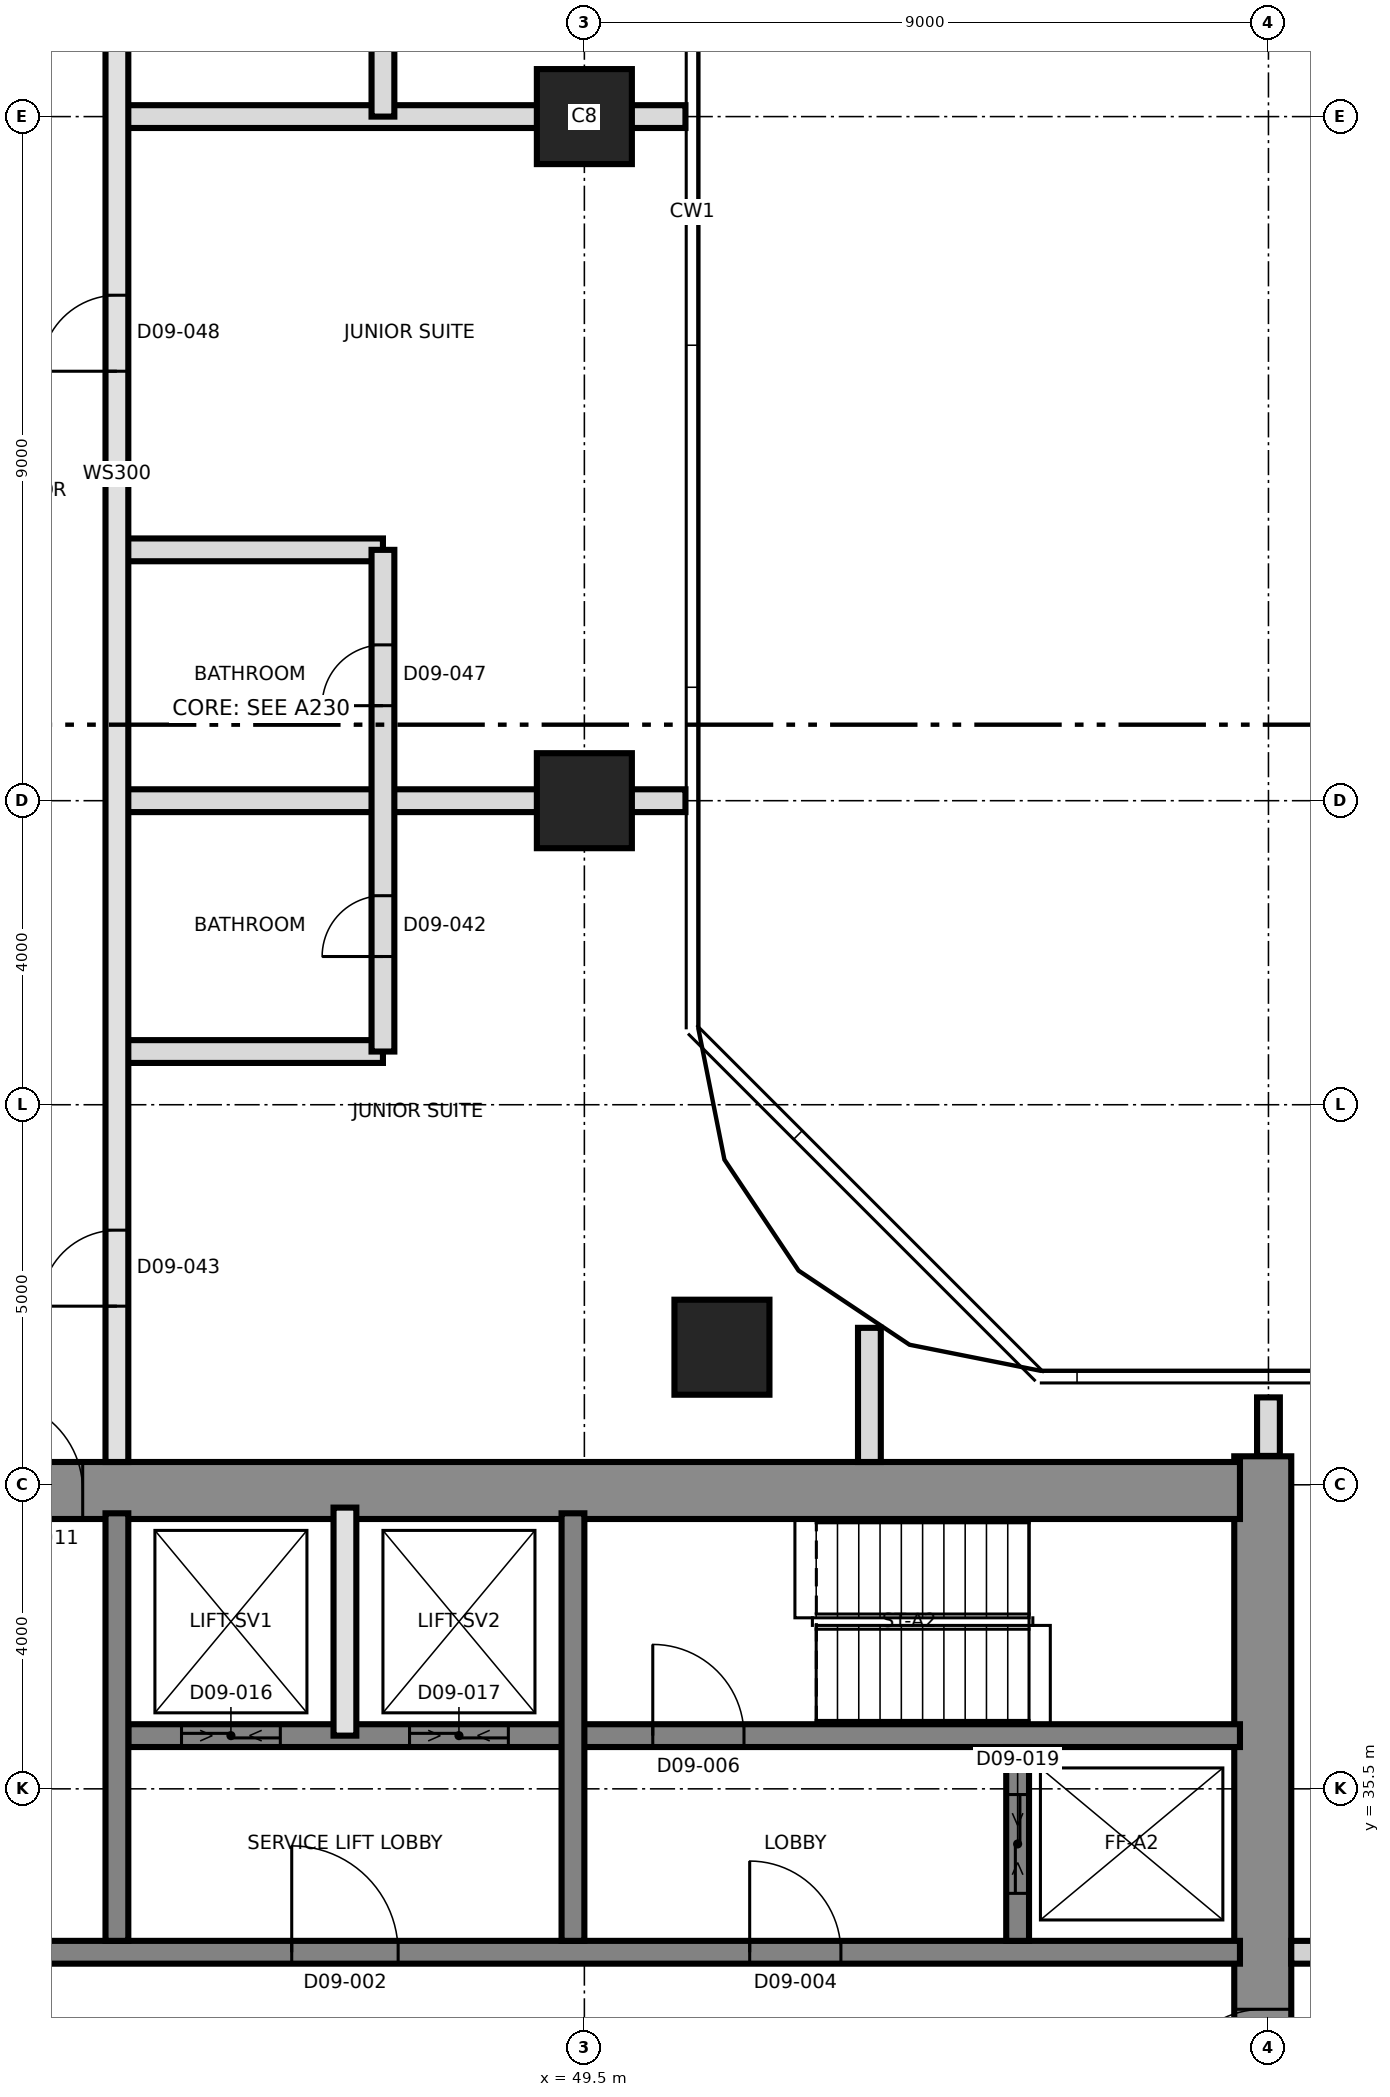
"""IFC4 building model, lengths in metres.
Left out: names, types, materials, properties, quantities, classifications, styles, units other than length and angle.
Written with IfcOpenShell. Run it as: python <this file> out.ifc"""

import sys

from ifc_helpers import new_model, si_unit, direction, frame, frame_2d, origin, origin_2d, place, context, subcontext, project, spatial, rectangle, extrude, element, fill, save


model = new_model("IFC4")
c1 = context("Model", 3, precision=1e-05, world=origin(), true_north=direction((0.0, 1.0)))
c2 = subcontext(c1, "Body", "Model", "MODEL_VIEW")
j1 = project(units=[si_unit("LENGTHUNIT", "METRE"), si_unit("PLANEANGLEUNIT", "RADIAN")], contexts=[c1])
p1 = place(None, origin())
s1 = spatial("IfcSite", under=j1, at=p1, CompositionType="ELEMENT")
p2 = place(p1, origin())
s2 = spatial("IfcBuilding", under=s1, at=p2, CompositionType="ELEMENT")
p3 = place(p2, frame((0.0, 0.0, 113.0)))
s3 = spatial("IfcBuildingStorey", under=s2, at=p3, CompositionType="ELEMENT", Elevation=113.0)
p4 = place(p3, frame((58.425, 21.125, 0.0), z_axis=(0.0, 0.0, 1.0), x_axis=(0.0, 1.0, 0.0)))
e1 = element("IfcWall", 1, at=p4, inside=s3, PredefinedType="SHEAR", context=c2, shape_type="SweptSolid", body=[
    extrude(rectangle(XDim=18.75, YDim=0.75, at=frame_2d((9.375, 0.0))), origin(), (0.0, 0.0, 1.0), 3.7),
])
p5 = place(p4, frame((10.275, 0.0, 0.0)))
e2 = element("IfcOpeningElement", 2, at=p5, cuts=e1, PredefinedType="OPENING", context=c2, shape_type="SweptSolid", body=[
    extrude(rectangle(XDim=1.2, YDim=2.1, at=frame_2d((0.6, 1.05))), frame((0.0, 0.385, 0.0), z_axis=(0.0, -1.0, 0.0), x_axis=(1.0, 0.0, 0.0)), (0.0, 0.0, 1.0), 0.77),
])
p6 = place(p3, frame((31.125, 39.425, 0.0), z_axis=(0.0, 0.0, 1.0), x_axis=(1.0, 0.0, 0.0)))
e3 = element("IfcWall", 3, at=p6, inside=s3, PredefinedType="SHEAR", context=c2, shape_type="SweptSolid", body=[
    extrude(rectangle(XDim=27.0, YDim=0.75, at=frame_2d((13.5, 0.0))), origin(), (0.0, 0.0, 1.0), 3.7),
])
p7 = place(p6, frame((10.575, 0.0, 0.0)))
e4 = element("IfcOpeningElement", 4, at=p7, cuts=e3, PredefinedType="OPENING", context=c2, shape_type="SweptSolid", body=[
    extrude(rectangle(XDim=1.2, YDim=2.1, at=frame_2d((0.6, 1.05))), frame((0.0, 0.385, 0.0), z_axis=(0.0, -1.0, 0.0), x_axis=(1.0, 0.0, 0.0)), (0.0, 0.0, 1.0), 0.77),
])
p8 = place(p3, frame((31.875, 33.35, 0.0), z_axis=(0.0, 0.0, 1.0), x_axis=(1.0, 0.0, 0.0)))
e5 = element("IfcWall", 5, at=p8, inside=s3, PredefinedType="SHEAR", context=c2, shape_type="SweptSolid", body=[
    extrude(rectangle(XDim=26.25, YDim=0.3, at=frame_2d((13.125, 0.0))), origin(), (0.0, 0.0, 1.0), 3.7),
])
p9 = place(p8, frame((13.775, 0.0, 0.0)))
e6 = element("IfcOpeningElement", 6, at=p9, cuts=e5, PredefinedType="OPENING", context=c2, shape_type="SweptSolid", body=[
    extrude(rectangle(XDim=1.4, YDim=2.1, at=frame_2d((0.7, 1.05))), frame((0.0, 0.16, 0.0), z_axis=(0.0, -1.0, 0.0), x_axis=(1.0, 0.0, 0.0)), (0.0, 0.0, 1.0), 0.32),
])
p10 = place(p8, frame((5.25, 0.0, 0.0)))
e7 = element("IfcOpeningElement", 7, at=p10, cuts=e5, PredefinedType="OPENING", context=c2, shape_type="SweptSolid", body=[
    extrude(rectangle(XDim=1.2, YDim=2.1, at=frame_2d((0.6, 1.05))), frame((0.0, 0.16, 0.0), z_axis=(0.0, -1.0, 0.0), x_axis=(1.0, 0.0, 0.0)), (0.0, 0.0, 1.0), 0.32),
])
p11 = place(p8, frame((19.8, 0.0, 0.0)))
e8 = element("IfcOpeningElement", 8, at=p11, cuts=e5, PredefinedType="OPENING", context=c2, shape_type="SweptSolid", body=[
    extrude(rectangle(XDim=1.2, YDim=2.1, at=frame_2d((0.6, 1.05))), frame((0.0, 0.16, 0.0), z_axis=(0.0, -1.0, 0.0), x_axis=(1.0, 0.0, 0.0)), (0.0, 0.0, 1.0), 0.32),
])
p12 = place(p3, frame((43.5, 36.2, 0.0), z_axis=(0.0, 0.0, 1.0), x_axis=(1.0, 0.0, 0.0)))
e9 = element("IfcWall", 9, at=p12, inside=s3, PredefinedType="SHEAR", context=c2, shape_type="SweptSolid", body=[
    extrude(rectangle(XDim=14.625, YDim=0.3, at=frame_2d((7.312, 0.0))), origin(), (0.0, 0.0, 1.0), 3.7),
])
p13 = place(p12, frame((6.9, 0.0, 0.0)))
e10 = element("IfcOpeningElement", 10, at=p13, cuts=e9, PredefinedType="OPENING", context=c2, shape_type="SweptSolid", body=[
    extrude(rectangle(XDim=1.2, YDim=2.1, at=frame_2d((0.6, 1.05))), frame((0.0, 0.16, 0.0), z_axis=(0.0, -1.0, 0.0), x_axis=(1.0, 0.0, 0.0)), (0.0, 0.0, 1.0), 0.32),
])
p14 = place(p12, frame((0.7, 0.0, 0.0)))
e11 = element("IfcOpeningElement", 11, at=p14, cuts=e9, PredefinedType="OPENING", context=c2, shape_type="SweptSolid", body=[
    extrude(rectangle(XDim=1.3, YDim=2.4, at=frame_2d((0.65, 1.2))), frame((0.0, 0.16, 0.0), z_axis=(0.0, -1.0, 0.0), x_axis=(1.0, 0.0, 0.0)), (0.0, 0.0, 1.0), 0.32),
])
p15 = place(p12, frame((3.7, 0.0, 0.0)))
e12 = element("IfcOpeningElement", 12, at=p15, cuts=e9, PredefinedType="OPENING", context=c2, shape_type="SweptSolid", body=[
    extrude(rectangle(XDim=1.3, YDim=2.4, at=frame_2d((0.65, 1.2))), frame((0.0, 0.16, 0.0), z_axis=(0.0, -1.0, 0.0), x_axis=(1.0, 0.0, 0.0)), (0.0, 0.0, 1.0), 0.32),
])
for number, where, z_axis, x_axis in (
    (13, (43.35, 33.5, 0.0), (0.0, 0.0, 1.0), (0.0, 1.0, 0.0)),
    (14, (49.35, 33.5, 0.0), (0.0, 0.0, 1.0), (0.0, 1.0, 0.0)),
):
    element("IfcWall", number, at=place(p3, frame(where, z_axis=z_axis, x_axis=x_axis)), inside=s3, PredefinedType="SHEAR", context=c2, shape_type="SweptSolid", body=[
        extrude(rectangle(XDim=5.625, YDim=0.3, at=frame_2d((2.812, 0.0))), origin(), (0.0, 0.0, 1.0), 3.7),
    ])
p16 = place(p3, frame((55.2, 33.5, 0.0), z_axis=(0.0, 0.0, 1.0), x_axis=(0.0, 1.0, 0.0)))
e15 = element("IfcWall", 15, at=p16, inside=s3, PredefinedType="SHEAR", context=c2, shape_type="SweptSolid", body=[
    extrude(rectangle(XDim=2.55, YDim=0.3, at=frame_2d((1.275, 0.0))), origin(), (0.0, 0.0, 1.0), 3.7),
])
p17 = place(p16, frame((0.625, 0.0, 0.0)))
e16 = element("IfcOpeningElement", 16, at=p17, cuts=e15, PredefinedType="OPENING", context=c2, shape_type="SweptSolid", body=[
    extrude(rectangle(XDim=1.3, YDim=2.4, at=frame_2d((0.65, 1.2))), frame((0.0, 0.16, 0.0), z_axis=(0.0, -1.0, 0.0), x_axis=(1.0, 0.0, 0.0)), (0.0, 0.0, 1.0), 0.32),
])
for number, where, z_axis, x_axis in (
    (17, (51.31, 41.31, 0.0), (0.0, 0.0, 1.0), (1.0, 0.0, 0.0)),
    (18, (49.5, 48.5, 0.0), (0.0, 0.0, 1.0), (1.0, 0.0, 0.0)),
    (19, (49.5, 57.5, 0.0), (0.0, 0.0, 1.0), (1.0, 0.0, 0.0)),
):
    element("IfcColumn", number, at=place(p3, frame(where, z_axis=z_axis, x_axis=x_axis)), inside=s3, PredefinedType="COLUMN", context=c2, shape_type="SweptSolid", body=[
        extrude(rectangle(XDim=1.25, YDim=1.25, at=origin_2d()), origin(), (0.0, 0.0, 1.0), 3.7),
    ])
p18 = place(p3, frame((46.35, 36.2, 0.0), z_axis=(0.0, 0.0, 1.0), x_axis=(0.0, 1.0, 0.0)))
e20 = element("IfcWall", 20, at=p18, inside=s3, PredefinedType="SOLIDWALL", context=c2, shape_type="SweptSolid", body=[
    extrude(rectangle(XDim=3.0, YDim=0.3, at=frame_2d((1.5, 0.0))), origin(), (0.0, 0.0, 1.0), 3.4),
])
p19 = place(p3, frame((58.8, 33.35, 0.0), z_axis=(0.0, 0.0, 1.0), x_axis=(1.0, 0.0, 0.0)))
e21 = element("IfcWall", 21, at=p19, inside=s3, PredefinedType="PARTITIONING", context=c2, shape_type="SweptSolid", body=[
    extrude(rectangle(XDim=26.53, YDim=0.3, at=frame_2d((13.265, 0.0))), origin(), (0.0, 0.0, 1.0), 3.4),
])
p20 = place(p19, frame((2.05, 0.0, 0.0)))
e22 = element("IfcOpeningElement", 22, at=p20, cuts=e21, PredefinedType="OPENING", context=c2, shape_type="SweptSolid", body=[
    extrude(rectangle(XDim=1.0, YDim=2.4, at=frame_2d((0.5, 1.2))), frame((0.0, 0.16, 0.0), z_axis=(0.0, -1.0, 0.0), x_axis=(1.0, 0.0, 0.0)), (0.0, 0.0, 1.0), 0.32),
])
p21 = place(p19, frame((11.95, 0.0, 0.0)))
e23 = element("IfcOpeningElement", 23, at=p21, cuts=e21, PredefinedType="OPENING", context=c2, shape_type="SweptSolid", body=[
    extrude(rectangle(XDim=1.0, YDim=2.1, at=frame_2d((0.5, 1.05))), frame((0.0, 0.16, 0.0), z_axis=(0.0, -1.0, 0.0), x_axis=(1.0, 0.0, 0.0)), (0.0, 0.0, 1.0), 0.32),
])
p22 = place(p19, frame((13.6, 0.0, 0.0)))
e24 = element("IfcOpeningElement", 24, at=p22, cuts=e21, PredefinedType="OPENING", context=c2, shape_type="SweptSolid", body=[
    extrude(rectangle(XDim=1.0, YDim=2.1, at=frame_2d((0.5, 1.05))), frame((0.0, 0.16, 0.0), z_axis=(0.0, -1.0, 0.0), x_axis=(1.0, 0.0, 0.0)), (0.0, 0.0, 1.0), 0.32),
])
p23 = place(p19, frame((21.7, 0.0, 0.0)))
e25 = element("IfcOpeningElement", 25, at=p23, cuts=e21, PredefinedType="OPENING", context=c2, shape_type="SweptSolid", body=[
    extrude(rectangle(XDim=1.0, YDim=2.4, at=frame_2d((0.5, 1.2))), frame((0.0, 0.16, 0.0), z_axis=(0.0, -1.0, 0.0), x_axis=(1.0, 0.0, 0.0)), (0.0, 0.0, 1.0), 0.32),
])
p24 = place(p3, frame((43.35, 45.2, 0.0), z_axis=(0.0, 0.0, 1.0), x_axis=(1.0, 0.0, 0.0)))
e26 = element("IfcWall", 26, at=p24, inside=s3, PredefinedType="PARTITIONING", context=c2, shape_type="SweptSolid", body=[
    extrude(rectangle(XDim=3.5, YDim=0.3, at=frame_2d((1.75, 0.0))), origin(), (0.0, 0.0, 1.0), 3.4),
])
p25 = place(p3, frame((43.35, 48.5, 0.0), z_axis=(0.0, 0.0, 1.0), x_axis=(1.0, 0.0, 0.0)))
e27 = element("IfcWall", 27, at=p25, inside=s3, PredefinedType="PARTITIONING", context=c2, shape_type="SweptSolid", body=[
    extrude(rectangle(XDim=7.48, YDim=0.3, at=frame_2d((3.74, 0.0))), origin(), (0.0, 0.0, 1.0), 3.4),
])
p26 = place(p3, frame((43.35, 51.8, 0.0), z_axis=(0.0, 0.0, 1.0), x_axis=(1.0, 0.0, 0.0)))
e28 = element("IfcWall", 28, at=p26, inside=s3, PredefinedType="PARTITIONING", context=c2, shape_type="SweptSolid", body=[
    extrude(rectangle(XDim=3.5, YDim=0.3, at=frame_2d((1.75, 0.0))), origin(), (0.0, 0.0, 1.0), 3.4),
])
p27 = place(p3, frame((43.35, 57.5, 0.0), z_axis=(0.0, 0.0, 1.0), x_axis=(1.0, 0.0, 0.0)))
e29 = element("IfcWall", 29, at=p27, inside=s3, PredefinedType="PARTITIONING", context=c2, shape_type="SweptSolid", body=[
    extrude(rectangle(XDim=7.48, YDim=0.3, at=frame_2d((3.74, 0.0))), origin(), (0.0, 0.0, 1.0), 3.4),
])
p28 = place(p3, frame((43.35, 39.8, 0.0), z_axis=(0.0, 0.0, 1.0), x_axis=(0.0, 1.0, 0.0)))
e30 = element("IfcWall", 30, at=p28, inside=s3, PredefinedType="SOLIDWALL", context=c2, shape_type="SweptSolid", body=[
    extrude(rectangle(XDim=26.0, YDim=0.3, at=frame_2d((13.0, 0.0))), origin(), (0.0, 0.0, 1.0), 3.4),
])
p29 = place(p28, frame((2.05, 0.0, 0.0)))
e31 = element("IfcOpeningElement", 31, at=p29, cuts=e30, PredefinedType="OPENING", context=c2, shape_type="SweptSolid", body=[
    extrude(rectangle(XDim=1.0, YDim=2.4, at=frame_2d((0.5, 1.2))), frame((0.0, 0.16, 0.0), z_axis=(0.0, -1.0, 0.0), x_axis=(1.0, 0.0, 0.0)), (0.0, 0.0, 1.0), 0.32),
])
p30 = place(p28, frame((14.35, 0.0, 0.0)))
e32 = element("IfcOpeningElement", 32, at=p30, cuts=e30, PredefinedType="OPENING", context=c2, shape_type="SweptSolid", body=[
    extrude(rectangle(XDim=1.0, YDim=2.4, at=frame_2d((0.5, 1.2))), frame((0.0, 0.16, 0.0), z_axis=(0.0, -1.0, 0.0), x_axis=(1.0, 0.0, 0.0)), (0.0, 0.0, 1.0), 0.32),
])
p31 = place(p28, frame((21.25, 0.0, 0.0)))
e33 = element("IfcOpeningElement", 33, at=p31, cuts=e30, PredefinedType="OPENING", context=c2, shape_type="SweptSolid", body=[
    extrude(rectangle(XDim=1.0, YDim=2.4, at=frame_2d((0.5, 1.2))), frame((0.0, 0.16, 0.0), z_axis=(0.0, -1.0, 0.0), x_axis=(1.0, 0.0, 0.0)), (0.0, 0.0, 1.0), 0.32),
])
p32 = place(p3, frame((46.85, 45.2, 0.0), z_axis=(0.0, 0.0, 1.0), x_axis=(0.0, 1.0, 0.0)))
e34 = element("IfcWall", 34, at=p32, inside=s3, PredefinedType="PARTITIONING", context=c2, shape_type="SweptSolid", body=[
    extrude(rectangle(XDim=6.6, YDim=0.3, at=frame_2d((3.3, 0.0))), origin(), (0.0, 0.0, 1.0), 3.4),
])
p33 = place(p32, frame((1.25, 0.0, 0.0)))
e35 = element("IfcOpeningElement", 35, at=p33, cuts=e34, PredefinedType="OPENING", context=c2, shape_type="SweptSolid", body=[
    extrude(rectangle(XDim=0.8, YDim=2.1, at=frame_2d((0.4, 1.05))), frame((0.0, 0.16, 0.0), z_axis=(0.0, -1.0, 0.0), x_axis=(1.0, 0.0, 0.0)), (0.0, 0.0, 1.0), 0.32),
])
p34 = place(p32, frame((4.55, 0.0, 0.0)))
e36 = element("IfcOpeningElement", 36, at=p34, cuts=e34, PredefinedType="OPENING", context=c2, shape_type="SweptSolid", body=[
    extrude(rectangle(XDim=0.8, YDim=2.1, at=frame_2d((0.4, 1.05))), frame((0.0, 0.16, 0.0), z_axis=(0.0, -1.0, 0.0), x_axis=(1.0, 0.0, 0.0)), (0.0, 0.0, 1.0), 0.32),
])
p35 = place(p3, frame((46.85, 57.5, 0.0), z_axis=(0.0, 0.0, 1.0), x_axis=(0.0, 1.0, 0.0)))
e37 = element("IfcWall", 37, at=p35, inside=s3, PredefinedType="PARTITIONING", context=c2, shape_type="SweptSolid", body=[
    extrude(rectangle(XDim=3.3, YDim=0.3, at=frame_2d((1.65, 0.0))), origin(), (0.0, 0.0, 1.0), 3.4),
])
p36 = place(p35, frame((1.25, 0.0, 0.0)))
e38 = element("IfcOpeningElement", 38, at=p36, cuts=e37, PredefinedType="OPENING", context=c2, shape_type="SweptSolid", body=[
    extrude(rectangle(XDim=0.8, YDim=2.1, at=frame_2d((0.4, 1.05))), frame((0.0, 0.16, 0.0), z_axis=(0.0, -1.0, 0.0), x_axis=(1.0, 0.0, 0.0)), (0.0, 0.0, 1.0), 0.32),
])
p37 = place(p3, frame((53.25, 39.8, 0.0), z_axis=(0.0, 0.0, 1.0), x_axis=(0.0, 1.0, 0.0)))
e39 = element("IfcWall", 39, at=p37, inside=s3, PredefinedType="PARTITIONING", context=c2, shape_type="SweptSolid", body=[
    extrude(rectangle(XDim=1.765, YDim=0.3, at=frame_2d((0.882, 0.0))), origin(), (0.0, 0.0, 1.0), 3.4),
])
p38 = place(p3, frame((58.5, 39.88, 0.0), z_axis=(0.0, 0.0, 1.0), x_axis=(0.0, 1.0, 0.0)))
e40 = element("IfcWall", 40, at=p38, inside=s3, PredefinedType="PARTITIONING", context=c2, shape_type="SweptSolid", body=[
    extrude(rectangle(XDim=0.77, YDim=0.3, at=frame_2d((0.385, 0.0))), origin(), (0.0, 0.0, 1.0), 3.4),
])
p39 = place(p9, origin())
e41 = element("IfcDoor", 41, at=p39, inside=s3, OperationType="SINGLE_SWING_RIGHT", PredefinedType="DOOR", context=c2, shape_type="SweptSolid", body=[
    extrude(rectangle(XDim=1.4, YDim=2.1, at=frame_2d((0.7, 1.05))), frame((0.0, 0.025, 0.0), z_axis=(0.0, -1.0, 0.0), x_axis=(1.0, 0.0, 0.0)), (0.0, 0.0, 1.0), 0.05),
])
fill(e6, e41)
p40 = place(p11, origin())
e42 = element("IfcDoor", 42, at=p40, inside=s3, OperationType="SINGLE_SWING_RIGHT", PredefinedType="DOOR", context=c2, shape_type="SweptSolid", body=[
    extrude(rectangle(XDim=1.2, YDim=2.1, at=frame_2d((0.6, 1.05))), frame((0.0, 0.025, 0.0), z_axis=(0.0, -1.0, 0.0), x_axis=(1.0, 0.0, 0.0)), (0.0, 0.0, 1.0), 0.05),
])
fill(e8, e42)
p41 = place(p13, origin())
e43 = element("IfcDoor", 43, at=p41, inside=s3, OperationType="SINGLE_SWING_LEFT", PredefinedType="DOOR", context=c2, shape_type="SweptSolid", body=[
    extrude(rectangle(XDim=1.2, YDim=2.1, at=frame_2d((0.6, 1.05))), frame((0.0, 0.025, 0.0), z_axis=(0.0, -1.0, 0.0), x_axis=(1.0, 0.0, 0.0)), (0.0, 0.0, 1.0), 0.05),
])
fill(e10, e43)
p42 = place(p5, origin())
e44 = element("IfcDoor", 44, at=p42, inside=s3, OperationType="SINGLE_SWING_LEFT", PredefinedType="DOOR", context=c2, shape_type="SweptSolid", body=[
    extrude(rectangle(XDim=1.2, YDim=2.1, at=frame_2d((0.6, 1.05))), frame((0.0, 0.025, 0.0), z_axis=(0.0, -1.0, 0.0), x_axis=(1.0, 0.0, 0.0)), (0.0, 0.0, 1.0), 0.05),
])
fill(e2, e44)
p43 = place(p7, origin())
e45 = element("IfcDoor", 45, at=p43, inside=s3, OperationType="SINGLE_SWING_RIGHT", PredefinedType="DOOR", context=c2, shape_type="SweptSolid", body=[
    extrude(rectangle(XDim=1.2, YDim=2.1, at=frame_2d((0.6, 1.05))), frame((0.0, 0.025, 0.0), z_axis=(0.0, -1.0, 0.0), x_axis=(1.0, 0.0, 0.0)), (0.0, 0.0, 1.0), 0.05),
])
fill(e4, e45)
p44 = place(p14, origin())
e46 = element("IfcDoor", 46, at=p44, inside=s3, OperationType="SLIDING_TO_LEFT", PredefinedType="DOOR", context=c2, shape_type="SweptSolid", body=[
    extrude(rectangle(XDim=1.3, YDim=2.4, at=frame_2d((0.65, 1.2))), frame((0.0, 0.025, 0.0), z_axis=(0.0, -1.0, 0.0), x_axis=(1.0, 0.0, 0.0)), (0.0, 0.0, 1.0), 0.05),
])
fill(e11, e46)
p45 = place(p15, origin())
e47 = element("IfcDoor", 47, at=p45, inside=s3, OperationType="SLIDING_TO_LEFT", PredefinedType="DOOR", context=c2, shape_type="SweptSolid", body=[
    extrude(rectangle(XDim=1.3, YDim=2.4, at=frame_2d((0.65, 1.2))), frame((0.0, 0.025, 0.0), z_axis=(0.0, -1.0, 0.0), x_axis=(1.0, 0.0, 0.0)), (0.0, 0.0, 1.0), 0.05),
])
fill(e12, e47)
p46 = place(p17, origin())
e48 = element("IfcDoor", 48, at=p46, inside=s3, OperationType="SLIDING_TO_LEFT", PredefinedType="DOOR", context=c2, shape_type="SweptSolid", body=[
    extrude(rectangle(XDim=1.3, YDim=2.4, at=frame_2d((0.65, 1.2))), frame((0.0, 0.025, 0.0), z_axis=(0.0, -1.0, 0.0), x_axis=(1.0, 0.0, 0.0)), (0.0, 0.0, 1.0), 0.05),
])
fill(e16, e48)
p47 = place(p33, origin())
e49 = element("IfcDoor", 49, at=p47, inside=s3, OperationType="SINGLE_SWING_LEFT", PredefinedType="DOOR", context=c2, shape_type="SweptSolid", body=[
    extrude(rectangle(XDim=0.8, YDim=2.1, at=frame_2d((0.4, 1.05))), frame((0.0, 0.025, 0.0), z_axis=(0.0, -1.0, 0.0), x_axis=(1.0, 0.0, 0.0)), (0.0, 0.0, 1.0), 0.05),
])
fill(e35, e49)
p48 = place(p29, origin())
e50 = element("IfcDoor", 50, at=p48, inside=s3, OperationType="SINGLE_SWING_LEFT", PredefinedType="DOOR", context=c2, shape_type="SweptSolid", body=[
    extrude(rectangle(XDim=1.0, YDim=2.4, at=frame_2d((0.5, 1.2))), frame((0.0, 0.025, 0.0), z_axis=(0.0, -1.0, 0.0), x_axis=(1.0, 0.0, 0.0)), (0.0, 0.0, 1.0), 0.05),
])
fill(e31, e50)
p49 = place(p34, origin())
e51 = element("IfcDoor", 51, at=p49, inside=s3, OperationType="SINGLE_SWING_LEFT", PredefinedType="DOOR", context=c2, shape_type="SweptSolid", body=[
    extrude(rectangle(XDim=0.8, YDim=2.1, at=frame_2d((0.4, 1.05))), frame((0.0, 0.025, 0.0), z_axis=(0.0, -1.0, 0.0), x_axis=(1.0, 0.0, 0.0)), (0.0, 0.0, 1.0), 0.05),
])
fill(e36, e51)
p50 = place(p30, origin())
e52 = element("IfcDoor", 52, at=p50, inside=s3, OperationType="SINGLE_SWING_RIGHT", PredefinedType="DOOR", context=c2, shape_type="SweptSolid", body=[
    extrude(rectangle(XDim=1.0, YDim=2.4, at=frame_2d((0.5, 1.2))), frame((0.0, 0.025, 0.0), z_axis=(0.0, -1.0, 0.0), x_axis=(1.0, 0.0, 0.0)), (0.0, 0.0, 1.0), 0.05),
])
fill(e32, e52)
save(model, sys.argv[1])
